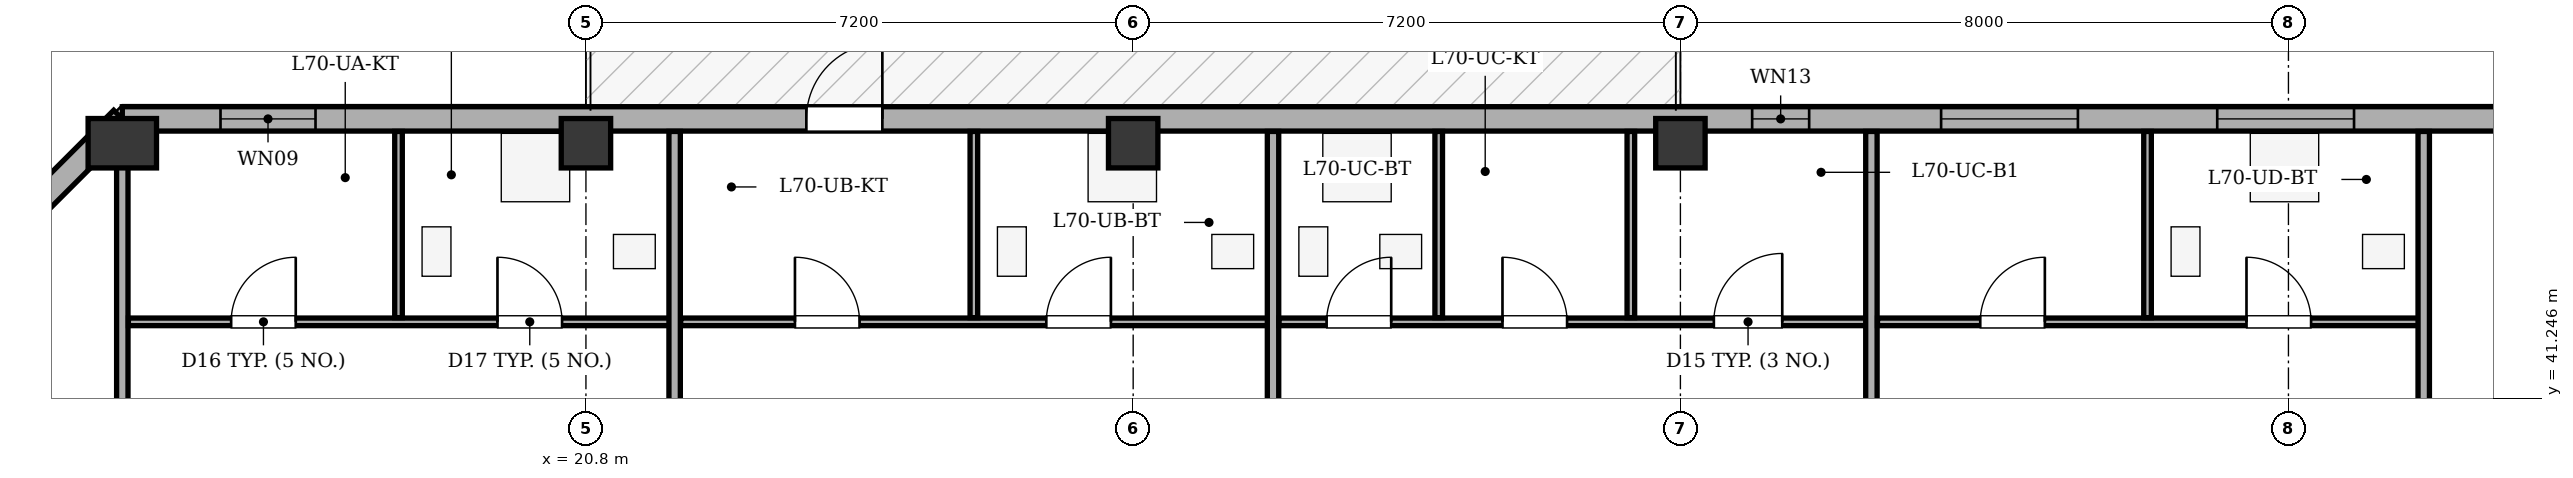
"""IFC4 building model, lengths in metres.
Left out: names, types, materials, properties, quantities, classifications, styles, units other than length and angle.
Written with IfcOpenShell. Run it as: python <this file> out.ifc"""

import sys

from ifc_helpers import new_model, si_unit, direction, frame, frame_2d, origin, origin_2d, place, context, subcontext, project, spatial, rectangle, extrude, element, fill, save


model = new_model("IFC4")
c1 = context("Model", 3, precision=1e-05, world=origin(), true_north=direction((0.0, 1.0)))
c2 = subcontext(c1, "Body", "Model", "MODEL_VIEW")
j1 = project(units=[si_unit("LENGTHUNIT", "METRE"), si_unit("PLANEANGLEUNIT", "RADIAN")], contexts=[c1])
p1 = place(None, origin())
s1 = spatial("IfcSite", under=j1, at=p1, CompositionType="ELEMENT")
p2 = place(p1, origin())
s2 = spatial("IfcBuilding", under=s1, at=p2, CompositionType="ELEMENT")
p3 = place(p2, frame((0.0, 0.0, 265.3)))
s3 = spatial("IfcBuildingStorey", under=s2, at=p3, CompositionType="ELEMENT", Elevation=265.3)
p4 = place(p3, frame((14.7, 44.6, 0.0), z_axis=(0.0, 0.0, 1.0), x_axis=(1.0, 0.0, 0.0)))
e1 = element("IfcColumn", 1, at=p4, inside=s3, PredefinedType="COLUMN", context=c2, shape_type="SweptSolid", body=[
    extrude(rectangle(XDim=0.65, YDim=0.9, at=origin_2d()), origin(), (0.0, 0.0, 1.0), 3.4),
])
for number, where, z_axis, x_axis in (
    (2, (20.8, 44.6, 0.0), (0.0, 0.0, 1.0), (1.0, 0.0, 0.0)),
    (3, (28.0, 44.6, 0.0), (0.0, 0.0, 1.0), (1.0, 0.0, 0.0)),
    (4, (35.2, 44.6, 0.0), (0.0, 0.0, 1.0), (1.0, 0.0, 0.0)),
):
    element("IfcColumn", number, at=place(p3, frame(where, z_axis=z_axis, x_axis=x_axis)), inside=s3, PredefinedType="COLUMN", context=c2, shape_type="SweptSolid", body=[
        extrude(rectangle(XDim=0.65, YDim=0.65, at=origin_2d()), origin(), (0.0, 0.0, 1.0), 3.4),
    ])
p5 = place(p3, frame((10.88, 41.1, 0.0), z_axis=(0.0, 0.0, 1.0), x_axis=(0.70712937715, 0.707084184501, 0.0)))
e5 = element("IfcWall", 5, at=p5, inside=s3, PredefinedType="STANDARD", context=c2, shape_type="SweptSolid", body=[
    extrude(rectangle(XDim=5.402, YDim=0.32, at=frame_2d((2.701, 0.0))), origin(), (0.0, 0.0, 1.0), 2.335),
])
p6 = place(p5, frame((2.001, 0.0, 0.75)))
e6 = element("IfcOpeningElement", 6, at=p6, cuts=e5, PredefinedType="OPENING", context=c2, shape_type="SweptSolid", body=[
    extrude(rectangle(XDim=1.4, YDim=1.465, at=frame_2d((0.7, 0.732))), frame((0.0, 0.17, 0.0), z_axis=(0.0, -1.0, 0.0), x_axis=(1.0, 0.0, 0.0)), (0.0, 0.0, 1.0), 0.34),
])
p7 = place(p3, frame((14.7, 44.92, 0.0), z_axis=(0.0, 0.0, 1.0), x_axis=(1.0, 0.0, 0.0)))
e7 = element("IfcWall", 7, at=p7, inside=s3, PredefinedType="STANDARD", context=c2, shape_type="SweptSolid", body=[
    extrude(rectangle(XDim=37.0, YDim=0.32, at=frame_2d((18.5, 0.0))), origin(), (0.0, 0.0, 1.0), 2.335),
])
p8 = place(p7, frame((9.0, 0.0, 0.0)))
e8 = element("IfcOpeningElement", 8, at=p8, cuts=e7, PredefinedType="OPENING", context=c2, shape_type="SweptSolid", body=[
    extrude(rectangle(XDim=1.0, YDim=2.02, at=frame_2d((0.5, 1.01))), frame((0.0, 0.17, 0.0), z_axis=(0.0, -1.0, 0.0), x_axis=(1.0, 0.0, 0.0)), (0.0, 0.0, 1.0), 0.34),
])
p9 = place(p7, frame((1.292, 0.0, 0.75)))
e9 = element("IfcOpeningElement", 9, at=p9, cuts=e7, PredefinedType="OPENING", context=c2, shape_type="SweptSolid", body=[
    extrude(rectangle(XDim=1.25, YDim=1.465, at=frame_2d((0.625, 0.732))), frame((0.0, 0.17, 0.0), z_axis=(0.0, -1.0, 0.0), x_axis=(1.0, 0.0, 0.0)), (0.0, 0.0, 1.0), 0.34),
])
p10 = place(p7, frame((23.93, 0.0, 0.75)))
e10 = element("IfcOpeningElement", 10, at=p10, cuts=e7, PredefinedType="OPENING", context=c2, shape_type="SweptSolid", body=[
    extrude(rectangle(XDim=1.8, YDim=1.465, at=frame_2d((0.9, 0.732))), frame((0.0, 0.17, 0.0), z_axis=(0.0, -1.0, 0.0), x_axis=(1.0, 0.0, 0.0)), (0.0, 0.0, 1.0), 0.34),
])
p11 = place(p7, frame((27.563, 0.0, 0.75)))
e11 = element("IfcOpeningElement", 11, at=p11, cuts=e7, PredefinedType="OPENING", context=c2, shape_type="SweptSolid", body=[
    extrude(rectangle(XDim=1.8, YDim=1.465, at=frame_2d((0.9, 0.732))), frame((0.0, 0.17, 0.0), z_axis=(0.0, -1.0, 0.0), x_axis=(1.0, 0.0, 0.0)), (0.0, 0.0, 1.0), 0.34),
])
p12 = place(p7, frame((32.825, 0.0, 0.75)))
e12 = element("IfcOpeningElement", 12, at=p12, cuts=e7, PredefinedType="OPENING", context=c2, shape_type="SweptSolid", body=[
    extrude(rectangle(XDim=1.8, YDim=1.465, at=frame_2d((0.9, 0.732))), frame((0.0, 0.17, 0.0), z_axis=(0.0, -1.0, 0.0), x_axis=(1.0, 0.0, 0.0)), (0.0, 0.0, 1.0), 0.34),
])
p13 = place(p7, frame((21.444, 0.0, 0.75)))
e13 = element("IfcOpeningElement", 13, at=p13, cuts=e7, PredefinedType="OPENING", context=c2, shape_type="SweptSolid", body=[
    extrude(rectangle(XDim=0.75, YDim=1.45, at=frame_2d((0.375, 0.725))), frame((0.0, 0.17, 0.0), z_axis=(0.0, -1.0, 0.0), x_axis=(1.0, 0.0, 0.0)), (0.0, 0.0, 1.0), 0.34),
])
p14 = place(p3, frame((14.7, 36.1, 0.0), z_axis=(0.0, 0.0, 1.0), x_axis=(0.0, 1.0, 0.0)))
e14 = element("IfcWall", 14, at=p14, inside=s3, PredefinedType="PARTITIONING", context=c2, shape_type="SweptSolid", body=[
    extrude(rectangle(XDim=8.655, YDim=0.15, at=frame_2d((4.327, 0.0))), origin(), (0.0, 0.0, 1.0), 2.95),
])
p15 = place(p3, frame((14.78, 42.25, 0.0), z_axis=(0.0, 0.0, 1.0), x_axis=(1.0, 0.0, 0.0)))
e15 = element("IfcWall", 15, at=p15, inside=s3, PredefinedType="PARTITIONING", context=c2, shape_type="SweptSolid", body=[
    extrude(rectangle(XDim=7.227, YDim=0.1, at=frame_2d((3.614, 0.0))), origin(), (0.0, 0.0, 1.0), 2.95),
])
p16 = place(p15, frame((1.352, 0.0, 0.0)))
e16 = element("IfcOpeningElement", 16, at=p16, cuts=e15, PredefinedType="OPENING", context=c2, shape_type="SweptSolid", body=[
    extrude(rectangle(XDim=0.85, YDim=2.05, at=frame_2d((0.425, 1.025))), frame((0.0, 0.06, 0.0), z_axis=(0.0, -1.0, 0.0), x_axis=(1.0, 0.0, 0.0)), (0.0, 0.0, 1.0), 0.12),
])
p17 = place(p15, frame((4.856, 0.0, 0.0)))
e17 = element("IfcOpeningElement", 17, at=p17, cuts=e15, PredefinedType="OPENING", context=c2, shape_type="SweptSolid", body=[
    extrude(rectangle(XDim=0.85, YDim=2.05, at=frame_2d((0.425, 1.025))), frame((0.0, 0.06, 0.0), z_axis=(0.0, -1.0, 0.0), x_axis=(1.0, 0.0, 0.0)), (0.0, 0.0, 1.0), 0.12),
])
p18 = place(p3, frame((18.334, 42.305, 0.0), z_axis=(0.0, 0.0, 1.0), x_axis=(0.0, 1.0, 0.0)))
e18 = element("IfcWall", 18, at=p18, inside=s3, PredefinedType="PARTITIONING", context=c2, shape_type="SweptSolid", body=[
    extrude(rectangle(XDim=2.45, YDim=0.1, at=frame_2d((1.225, 0.0))), origin(), (0.0, 0.0, 1.0), 2.95),
])
p19 = place(p3, frame((21.967, 36.1, 0.0), z_axis=(0.0, 0.0, 1.0), x_axis=(0.0, 1.0, 0.0)))
e19 = element("IfcWall", 19, at=p19, inside=s3, PredefinedType="PARTITIONING", context=c2, shape_type="SweptSolid", body=[
    extrude(rectangle(XDim=8.655, YDim=0.15, at=frame_2d((4.327, 0.0))), origin(), (0.0, 0.0, 1.0), 2.95),
])
p20 = place(p3, frame((22.047, 42.25, 0.0), z_axis=(0.0, 0.0, 1.0), x_axis=(1.0, 0.0, 0.0)))
e20 = element("IfcWall", 20, at=p20, inside=s3, PredefinedType="PARTITIONING", context=c2, shape_type="SweptSolid", body=[
    extrude(rectangle(XDim=7.833, YDim=0.1, at=frame_2d((3.917, 0.0))), origin(), (0.0, 0.0, 1.0), 2.95),
])
p21 = place(p20, frame((1.503, 0.0, 0.0)))
e21 = element("IfcOpeningElement", 21, at=p21, cuts=e20, PredefinedType="OPENING", context=c2, shape_type="SweptSolid", body=[
    extrude(rectangle(XDim=0.85, YDim=2.05, at=frame_2d((0.425, 1.025))), frame((0.0, 0.06, 0.0), z_axis=(0.0, -1.0, 0.0), x_axis=(1.0, 0.0, 0.0)), (0.0, 0.0, 1.0), 0.12),
])
p22 = place(p20, frame((4.81, 0.0, 0.0)))
e22 = element("IfcOpeningElement", 22, at=p22, cuts=e20, PredefinedType="OPENING", context=c2, shape_type="SweptSolid", body=[
    extrude(rectangle(XDim=0.85, YDim=2.05, at=frame_2d((0.425, 1.025))), frame((0.0, 0.06, 0.0), z_axis=(0.0, -1.0, 0.0), x_axis=(1.0, 0.0, 0.0)), (0.0, 0.0, 1.0), 0.12),
])
p23 = place(p3, frame((25.904, 42.305, 0.0), z_axis=(0.0, 0.0, 1.0), x_axis=(0.0, 1.0, 0.0)))
e23 = element("IfcWall", 23, at=p23, inside=s3, PredefinedType="PARTITIONING", context=c2, shape_type="SweptSolid", body=[
    extrude(rectangle(XDim=2.45, YDim=0.1, at=frame_2d((1.225, 0.0))), origin(), (0.0, 0.0, 1.0), 2.95),
])
p24 = place(p3, frame((29.84, 36.1, 0.0), z_axis=(0.0, 0.0, 1.0), x_axis=(0.0, 1.0, 0.0)))
e24 = element("IfcWall", 24, at=p24, inside=s3, PredefinedType="PARTITIONING", context=c2, shape_type="SweptSolid", body=[
    extrude(rectangle(XDim=8.655, YDim=0.15, at=frame_2d((4.327, 0.0))), origin(), (0.0, 0.0, 1.0), 2.385),
])
p25 = place(p3, frame((29.92, 42.25, 0.0), z_axis=(0.0, 0.0, 1.0), x_axis=(1.0, 0.0, 0.0)))
e25 = element("IfcWall", 25, at=p25, inside=s3, PredefinedType="PARTITIONING", context=c2, shape_type="SweptSolid", body=[
    extrude(rectangle(XDim=7.833, YDim=0.1, at=frame_2d((3.917, 0.0))), origin(), (0.0, 0.0, 1.0), 2.95),
])
p26 = place(p25, frame((0.625, 0.0, 0.0)))
e26 = element("IfcOpeningElement", 26, at=p26, cuts=e25, PredefinedType="OPENING", context=c2, shape_type="SweptSolid", body=[
    extrude(rectangle(XDim=0.85, YDim=2.05, at=frame_2d((0.425, 1.025))), frame((0.0, 0.06, 0.0), z_axis=(0.0, -1.0, 0.0), x_axis=(1.0, 0.0, 0.0)), (0.0, 0.0, 1.0), 0.12),
])
p27 = place(p25, frame((2.939, 0.0, 0.0)))
e27 = element("IfcOpeningElement", 27, at=p27, cuts=e25, PredefinedType="OPENING", context=c2, shape_type="SweptSolid", body=[
    extrude(rectangle(XDim=0.85, YDim=2.05, at=frame_2d((0.425, 1.025))), frame((0.0, 0.06, 0.0), z_axis=(0.0, -1.0, 0.0), x_axis=(1.0, 0.0, 0.0)), (0.0, 0.0, 1.0), 0.12),
])
p28 = place(p25, frame((5.72, 0.0, 0.0)))
e28 = element("IfcOpeningElement", 28, at=p28, cuts=e25, PredefinedType="OPENING", context=c2, shape_type="SweptSolid", body=[
    extrude(rectangle(XDim=0.9, YDim=2.05, at=frame_2d((0.45, 1.025))), frame((0.0, 0.06, 0.0), z_axis=(0.0, -1.0, 0.0), x_axis=(1.0, 0.0, 0.0)), (0.0, 0.0, 1.0), 0.12),
])
for number, where, z_axis, x_axis in (
    (29, (32.02, 42.305, 0.0), (0.0, 0.0, 1.0), (0.0, 1.0, 0.0)),
    (30, (34.548, 42.305, 0.0), (0.0, 0.0, 1.0), (0.0, 1.0, 0.0)),
):
    element("IfcWall", number, at=place(p3, frame(where, z_axis=z_axis, x_axis=x_axis)), inside=s3, PredefinedType="PARTITIONING", context=c2, shape_type="SweptSolid", body=[
        extrude(rectangle(XDim=2.45, YDim=0.1, at=frame_2d((1.225, 0.0))), origin(), (0.0, 0.0, 1.0), 2.95),
    ])
p29 = place(p3, frame((37.713, 36.1, 0.0), z_axis=(0.0, 0.0, 1.0), x_axis=(0.0, 1.0, 0.0)))
e31 = element("IfcWall", 31, at=p29, inside=s3, PredefinedType="PARTITIONING", context=c2, shape_type="SweptSolid", body=[
    extrude(rectangle(XDim=8.655, YDim=0.15, at=frame_2d((4.327, 0.0))), origin(), (0.0, 0.0, 1.0), 2.95),
])
p30 = place(p3, frame((37.793, 42.25, 0.0), z_axis=(0.0, 0.0, 1.0), x_axis=(1.0, 0.0, 0.0)))
e32 = element("IfcWall", 32, at=p30, inside=s3, PredefinedType="PARTITIONING", context=c2, shape_type="SweptSolid", body=[
    extrude(rectangle(XDim=7.227, YDim=0.1, at=frame_2d((3.614, 0.0))), origin(), (0.0, 0.0, 1.0), 2.95),
])
p31 = place(p30, frame((1.352, 0.0, 0.0)))
e33 = element("IfcOpeningElement", 33, at=p31, cuts=e32, PredefinedType="OPENING", context=c2, shape_type="SweptSolid", body=[
    extrude(rectangle(XDim=0.85, YDim=2.05, at=frame_2d((0.425, 1.025))), frame((0.0, 0.06, 0.0), z_axis=(0.0, -1.0, 0.0), x_axis=(1.0, 0.0, 0.0)), (0.0, 0.0, 1.0), 0.12),
])
p32 = place(p30, frame((4.855, 0.0, 0.0)))
e34 = element("IfcOpeningElement", 34, at=p32, cuts=e32, PredefinedType="OPENING", context=c2, shape_type="SweptSolid", body=[
    extrude(rectangle(XDim=0.85, YDim=2.05, at=frame_2d((0.425, 1.025))), frame((0.0, 0.06, 0.0), z_axis=(0.0, -1.0, 0.0), x_axis=(1.0, 0.0, 0.0)), (0.0, 0.0, 1.0), 0.12),
])
p33 = place(p3, frame((41.346, 42.305, 0.0), z_axis=(0.0, 0.0, 1.0), x_axis=(0.0, 1.0, 0.0)))
e35 = element("IfcWall", 35, at=p33, inside=s3, PredefinedType="PARTITIONING", context=c2, shape_type="SweptSolid", body=[
    extrude(rectangle(XDim=2.45, YDim=0.1, at=frame_2d((1.225, 0.0))), origin(), (0.0, 0.0, 1.0), 2.95),
])
p34 = place(p3, frame((44.98, 36.1, 0.0), z_axis=(0.0, 0.0, 1.0), x_axis=(0.0, 1.0, 0.0)))
e36 = element("IfcWall", 36, at=p34, inside=s3, PredefinedType="PARTITIONING", context=c2, shape_type="SweptSolid", body=[
    extrude(rectangle(XDim=8.655, YDim=0.15, at=frame_2d((4.327, 0.0))), origin(), (0.0, 0.0, 1.0), 2.95),
])
p35 = place(p8, origin())
e37 = element("IfcDoor", 37, at=p35, inside=s3, OperationType="SINGLE_SWING_RIGHT", PredefinedType="DOOR", context=c2, shape_type="SweptSolid", body=[
    extrude(rectangle(XDim=1.0, YDim=2.02, at=frame_2d((0.5, 1.01))), frame((0.0, 0.025, 0.0), z_axis=(0.0, -1.0, 0.0), x_axis=(1.0, 0.0, 0.0)), (0.0, 0.0, 1.0), 0.05),
])
fill(e8, e37)
p36 = place(p9, origin())
e38 = element("IfcWindow", 38, at=p36, inside=s3, PartitioningType="SINGLE_PANEL", PredefinedType="WINDOW", context=c2, shape_type="SweptSolid", body=[
    extrude(rectangle(XDim=1.25, YDim=1.465, at=frame_2d((0.625, 0.732))), frame((0.0, -0.01, 0.0), z_axis=(0.0, -1.0, 0.0), x_axis=(1.0, 0.0, 0.0)), (0.0, 0.0, 1.0), 0.06),
])
fill(e9, e38)
p37 = place(p10, origin())
e39 = element("IfcWindow", 39, at=p37, inside=s3, PartitioningType="SINGLE_PANEL", PredefinedType="WINDOW", context=c2, shape_type="SweptSolid", body=[
    extrude(rectangle(XDim=1.8, YDim=1.465, at=frame_2d((0.9, 0.732))), frame((0.0, -0.01, 0.0), z_axis=(0.0, -1.0, 0.0), x_axis=(1.0, 0.0, 0.0)), (0.0, 0.0, 1.0), 0.06),
])
fill(e10, e39)
p38 = place(p11, origin())
e40 = element("IfcWindow", 40, at=p38, inside=s3, PartitioningType="SINGLE_PANEL", PredefinedType="WINDOW", context=c2, shape_type="SweptSolid", body=[
    extrude(rectangle(XDim=1.8, YDim=1.465, at=frame_2d((0.9, 0.732))), frame((0.0, -0.01, 0.0), z_axis=(0.0, -1.0, 0.0), x_axis=(1.0, 0.0, 0.0)), (0.0, 0.0, 1.0), 0.06),
])
fill(e11, e40)
p39 = place(p13, origin())
e41 = element("IfcWindow", 41, at=p39, inside=s3, PartitioningType="SINGLE_PANEL", PredefinedType="WINDOW", context=c2, shape_type="SweptSolid", body=[
    extrude(rectangle(XDim=0.75, YDim=1.45, at=frame_2d((0.375, 0.725))), frame((0.0, -0.01, 0.0), z_axis=(0.0, -1.0, 0.0), x_axis=(1.0, 0.0, 0.0)), (0.0, 0.0, 1.0), 0.06),
])
fill(e13, e41)
p40 = place(p16, origin())
e42 = element("IfcDoor", 42, at=p40, inside=s3, OperationType="SINGLE_SWING_RIGHT", PredefinedType="DOOR", context=c2, shape_type="SweptSolid", body=[
    extrude(rectangle(XDim=0.85, YDim=2.05, at=frame_2d((0.425, 1.025))), frame((0.0, 0.025, 0.0), z_axis=(0.0, -1.0, 0.0), x_axis=(1.0, 0.0, 0.0)), (0.0, 0.0, 1.0), 0.05),
])
fill(e16, e42)
p41 = place(p17, origin())
e43 = element("IfcDoor", 43, at=p41, inside=s3, OperationType="SINGLE_SWING_LEFT", PredefinedType="DOOR", context=c2, shape_type="SweptSolid", body=[
    extrude(rectangle(XDim=0.85, YDim=2.05, at=frame_2d((0.425, 1.025))), frame((0.0, 0.025, 0.0), z_axis=(0.0, -1.0, 0.0), x_axis=(1.0, 0.0, 0.0)), (0.0, 0.0, 1.0), 0.05),
])
fill(e17, e43)
p42 = place(p21, origin())
e44 = element("IfcDoor", 44, at=p42, inside=s3, OperationType="SINGLE_SWING_LEFT", PredefinedType="DOOR", context=c2, shape_type="SweptSolid", body=[
    extrude(rectangle(XDim=0.85, YDim=2.05, at=frame_2d((0.425, 1.025))), frame((0.0, 0.025, 0.0), z_axis=(0.0, -1.0, 0.0), x_axis=(1.0, 0.0, 0.0)), (0.0, 0.0, 1.0), 0.05),
])
fill(e21, e44)
p43 = place(p22, origin())
e45 = element("IfcDoor", 45, at=p43, inside=s3, OperationType="SINGLE_SWING_RIGHT", PredefinedType="DOOR", context=c2, shape_type="SweptSolid", body=[
    extrude(rectangle(XDim=0.85, YDim=2.05, at=frame_2d((0.425, 1.025))), frame((0.0, 0.025, 0.0), z_axis=(0.0, -1.0, 0.0), x_axis=(1.0, 0.0, 0.0)), (0.0, 0.0, 1.0), 0.05),
])
fill(e22, e45)
p44 = place(p26, origin())
e46 = element("IfcDoor", 46, at=p44, inside=s3, OperationType="SINGLE_SWING_RIGHT", PredefinedType="DOOR", context=c2, shape_type="SweptSolid", body=[
    extrude(rectangle(XDim=0.85, YDim=2.05, at=frame_2d((0.425, 1.025))), frame((0.0, 0.025, 0.0), z_axis=(0.0, -1.0, 0.0), x_axis=(1.0, 0.0, 0.0)), (0.0, 0.0, 1.0), 0.05),
])
fill(e26, e46)
p45 = place(p27, origin())
e47 = element("IfcDoor", 47, at=p45, inside=s3, OperationType="SINGLE_SWING_LEFT", PredefinedType="DOOR", context=c2, shape_type="SweptSolid", body=[
    extrude(rectangle(XDim=0.85, YDim=2.05, at=frame_2d((0.425, 1.025))), frame((0.0, 0.025, 0.0), z_axis=(0.0, -1.0, 0.0), x_axis=(1.0, 0.0, 0.0)), (0.0, 0.0, 1.0), 0.05),
])
fill(e27, e47)
p46 = place(p28, origin())
e48 = element("IfcDoor", 48, at=p46, inside=s3, OperationType="SINGLE_SWING_RIGHT", PredefinedType="DOOR", context=c2, shape_type="SweptSolid", body=[
    extrude(rectangle(XDim=0.9, YDim=2.05, at=frame_2d((0.45, 1.025))), frame((0.0, 0.025, 0.0), z_axis=(0.0, -1.0, 0.0), x_axis=(1.0, 0.0, 0.0)), (0.0, 0.0, 1.0), 0.05),
])
fill(e28, e48)
p47 = place(p31, origin())
e49 = element("IfcDoor", 49, at=p47, inside=s3, OperationType="SINGLE_SWING_RIGHT", PredefinedType="DOOR", context=c2, shape_type="SweptSolid", body=[
    extrude(rectangle(XDim=0.85, YDim=2.05, at=frame_2d((0.425, 1.025))), frame((0.0, 0.025, 0.0), z_axis=(0.0, -1.0, 0.0), x_axis=(1.0, 0.0, 0.0)), (0.0, 0.0, 1.0), 0.05),
])
fill(e33, e49)
p48 = place(p32, origin())
e50 = element("IfcDoor", 50, at=p48, inside=s3, OperationType="SINGLE_SWING_LEFT", PredefinedType="DOOR", context=c2, shape_type="SweptSolid", body=[
    extrude(rectangle(XDim=0.85, YDim=2.05, at=frame_2d((0.425, 1.025))), frame((0.0, 0.025, 0.0), z_axis=(0.0, -1.0, 0.0), x_axis=(1.0, 0.0, 0.0)), (0.0, 0.0, 1.0), 0.05),
])
fill(e34, e50)
save(model, sys.argv[1])
